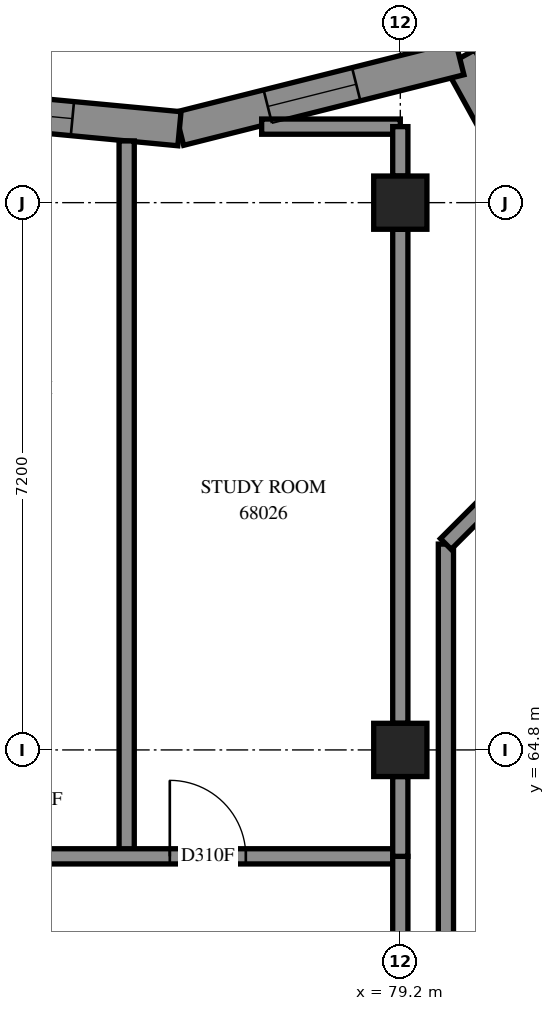
"""IFC4 building model, lengths in metres.
Left out: names, types, materials, properties, quantities, classifications, styles, units other than length and angle.
Written with IfcOpenShell. Run it as: python <this file> out.ifc"""

import sys

from ifc_helpers import new_model, si_unit, direction, frame, frame_2d, origin, origin_2d, place, context, subcontext, project, spatial, polyline, rectangle, outline, extrude, element, fill, save


model = new_model("IFC4")
c1 = context("Model", 3, precision=1e-05, world=origin(), true_north=direction((0.0, 1.0)))
c2 = subcontext(c1, "Body", "Model", "MODEL_VIEW")
j1 = project(units=[si_unit("LENGTHUNIT", "METRE"), si_unit("PLANEANGLEUNIT", "RADIAN")], contexts=[c1])
p1 = place(None, origin())
s1 = spatial("IfcSite", under=j1, at=p1, CompositionType="ELEMENT")
p2 = place(p1, origin())
s2 = spatial("IfcBuilding", under=s1, at=p2, CompositionType="ELEMENT")
p3 = place(p2, frame((0.0, 0.0, 250.6)))
s3 = spatial("IfcBuildingStorey", under=s2, at=p3, CompositionType="ELEMENT", Elevation=250.6)
for number, where, z_axis, x_axis in (
    (1, (79.2, 64.8, 0.0), (0.0, 0.0, 1.0), (1.0, 0.0, 0.0)),
    (2, (79.2, 72.0, 0.0), (0.0, 0.0, 1.0), (1.0, 0.0, 0.0)),
):
    element("IfcColumn", number, at=place(p3, frame(where, z_axis=z_axis, x_axis=x_axis)), inside=s3, PredefinedType="COLUMN", context=c2, shape_type="SweptSolid", body=[
        extrude(rectangle(XDim=0.7, YDim=0.7, at=origin_2d()), origin(), (0.0, 0.0, 1.0), 3.1),
    ])
p4 = place(p3, frame((81.594, 70.98, 0.0), z_axis=(0.0, 0.0, 1.0), x_axis=(-0.4832770015, 0.8754674979, 0.0)))
e3 = element("IfcWall", 3, at=p4, inside=s3, PredefinedType="SOLIDWALL", context=c2, shape_type="SweptSolid", body=[
    extrude(outline(polyline([(0.044, -0.225), (3.51, -0.225), (3.163, 0.225), (-0.044, 0.225), (0.044, -0.225)])), origin(), (0.0, 0.0, 1.0), 3.1),
])
p5 = place(p4, frame((0.757, 0.0, 0.45)))
e4 = element("IfcOpeningElement", 4, at=p5, cuts=e3, PredefinedType="OPENING", context=c2, shape_type="SweptSolid", body=[
    extrude(rectangle(XDim=1.2, YDim=2.55, at=frame_2d((0.6, 1.275))), frame((0.0, 0.235, 0.0), z_axis=(0.0, -1.0, 0.0), x_axis=(1.0, 0.0, 0.0)), (0.0, 0.0, 1.0), 0.47),
])
p6 = place(p3, frame((79.982, 73.9, 0.0), z_axis=(0.0, 0.0, 1.0), x_axis=(-0.9697607809, -0.2440574274, 0.0)))
e5 = element("IfcWall", 5, at=p6, inside=s3, PredefinedType="SOLIDWALL", context=c2, shape_type="SweptSolid", body=[
    extrude(outline(polyline([(-0.173, -0.225), (3.764, -0.225), (3.841, 0.225), (0.173, 0.225), (-0.173, -0.225)])), origin(), (0.0, 0.0, 1.0), 3.1),
])
p7 = place(p6, frame((1.405, 0.0, 0.45)))
e6 = element("IfcOpeningElement", 6, at=p7, cuts=e5, PredefinedType="OPENING", context=c2, shape_type="SweptSolid", body=[
    extrude(rectangle(XDim=1.2, YDim=2.55, at=frame_2d((0.6, 1.275))), frame((0.0, 0.235, 0.0), z_axis=(0.0, -1.0, 0.0), x_axis=(1.0, 0.0, 0.0)), (0.0, 0.0, 1.0), 0.47),
])
p8 = place(p3, frame((76.294, 72.972, 0.0), z_axis=(0.0, 0.0, 1.0), x_axis=(-0.9955612581, 0.0941157869, 0.0)))
e7 = element("IfcWall", 7, at=p8, inside=s3, PredefinedType="SOLIDWALL", context=c2, shape_type="SweptSolid", body=[
    extrude(outline(polyline([(0.039, -0.225), (3.874, -0.225), (3.832, 0.225), (-0.039, 0.225), (0.039, -0.225)])), origin(), (0.0, 0.0, 1.0), 3.1),
])
p9 = place(p8, frame((1.414, 0.0, 0.45)))
e8 = element("IfcOpeningElement", 8, at=p9, cuts=e7, PredefinedType="OPENING", context=c2, shape_type="SweptSolid", body=[
    extrude(rectangle(XDim=1.2, YDim=2.55, at=frame_2d((0.6, 1.275))), frame((0.0, 0.235, 0.0), z_axis=(0.0, -1.0, 0.0), x_axis=(1.0, 0.0, 0.0)), (0.0, 0.0, 1.0), 0.47),
])
p10 = place(p3, frame((79.8, 55.844, 0.0), z_axis=(0.0, 0.0, 1.0), x_axis=(0.0, 1.0, 0.0)))
e9 = element("IfcWall", 9, at=p10, inside=s3, PredefinedType="PARTITIONING", context=c2, shape_type="SweptSolid", body=[
    extrude(rectangle(XDim=11.664, YDim=0.2, at=frame_2d((5.832, 0.0))), origin(), (0.0, 0.0, 1.0), 3.1),
])
p11 = place(p3, frame((79.907, 55.739, 0.0), z_axis=(0.0, 0.0, 1.0), x_axis=(0.7071067812, 0.7071067812, 0.0)))
e10 = element("IfcWall", 10, at=p11, inside=s3, PredefinedType="PARTITIONING", context=c2, shape_type="SweptSolid", body=[
    extrude(rectangle(XDim=9.798, YDim=0.2, at=frame_2d((4.899, 0.0))), origin(), (0.0, 0.0, 1.0), 3.1),
])
p12 = place(p11, frame((0.617, 0.0, 0.0)))
e11 = element("IfcOpeningElement", 11, at=p12, cuts=e10, PredefinedType="OPENING", context=c2, shape_type="SweptSolid", body=[
    extrude(rectangle(XDim=1.0, YDim=2.1, at=frame_2d((0.5, 1.05))), frame((0.0, 0.11, 0.0), z_axis=(0.0, -1.0, 0.0), x_axis=(1.0, 0.0, 0.0)), (0.0, 0.0, 1.0), 0.22),
])
p13 = place(p3, frame((75.6, 63.4, 0.0), z_axis=(0.0, 0.0, 1.0), x_axis=(0.0, 1.0, 0.0)))
e12 = element("IfcWall", 12, at=p13, inside=s3, PredefinedType="PARTITIONING", context=c2, shape_type="SweptSolid", body=[
    extrude(rectangle(XDim=9.412, YDim=0.2, at=frame_2d((4.706, 0.0))), origin(), (0.0, 0.0, 1.0), 3.1),
])
p14 = place(p3, frame((79.2, 65.15, 0.0), z_axis=(0.0, 0.0, 1.0), x_axis=(0.0, 1.0, 0.0)))
e13 = element("IfcWall", 13, at=p14, inside=s3, PredefinedType="PARTITIONING", context=c2, shape_type="SweptSolid", body=[
    extrude(rectangle(XDim=6.5, YDim=0.2, at=frame_2d((3.25, 0.0))), origin(), (0.0, 0.0, 1.0), 3.1),
])
p15 = place(p3, frame((74.402, 63.4, 0.0), z_axis=(0.0, 0.0, 1.0), x_axis=(1.0, 0.0, 0.0)))
e14 = element("IfcWall", 14, at=p15, inside=s3, PredefinedType="PARTITIONING", context=c2, shape_type="SweptSolid", body=[
    extrude(rectangle(XDim=4.798, YDim=0.2, at=frame_2d((2.399, 0.0))), origin(), (0.0, 0.0, 1.0), 3.1),
])
p16 = place(p15, frame((1.766, 0.0, 0.0)))
e15 = element("IfcOpeningElement", 15, at=p16, cuts=e14, PredefinedType="OPENING", context=c2, shape_type="SweptSolid", body=[
    extrude(rectangle(XDim=1.0, YDim=2.1, at=frame_2d((0.5, 1.05))), frame((0.0, 0.11, 0.0), z_axis=(0.0, -1.0, 0.0), x_axis=(1.0, 0.0, 0.0)), (0.0, 0.0, 1.0), 0.22),
])
p17 = place(p3, frame((79.799, 67.509, 0.0), z_axis=(0.0, 0.0, 1.0), x_axis=(0.7070929906, 0.7071205715, 0.0)))
e16 = element("IfcWall", 16, at=p17, inside=s3, PredefinedType="PARTITIONING", context=c2, shape_type="SweptSolid", body=[
    extrude(rectangle(XDim=3.626, YDim=0.2, at=frame_2d((1.813, 0.0))), origin(), (0.0, 0.0, 1.0), 3.1),
])
p18 = place(p3, frame((79.2, 61.4, 0.0), z_axis=(0.0, 0.0, 1.0), x_axis=(0.0, 1.0, 0.0)))
e17 = element("IfcWall", 17, at=p18, inside=s3, PredefinedType="PARTITIONING", context=c2, shape_type="SweptSolid", body=[
    extrude(rectangle(XDim=2.0, YDim=0.2, at=frame_2d((1.0, 0.0))), origin(), (0.0, 0.0, 1.0), 3.1),
])
p19 = place(p3, frame((77.376, 73.0, 0.0), z_axis=(0.0, 0.0, 1.0), x_axis=(1.0, 0.0, 0.0)))
e18 = element("IfcWall", 18, at=p19, inside=s3, PredefinedType="PARTITIONING", context=c2, shape_type="SweptSolid", body=[
    extrude(rectangle(XDim=1.824, YDim=0.2, at=frame_2d((0.912, 0.0))), origin(), (0.0, 0.0, 1.0), 3.1),
])
p20 = place(p3, frame((79.2, 63.4, 0.0), z_axis=(0.0, 0.0, 1.0), x_axis=(0.0, 1.0, 0.0)))
e19 = element("IfcWall", 19, at=p20, inside=s3, PredefinedType="PARTITIONING", context=c2, shape_type="SweptSolid", body=[
    extrude(rectangle(XDim=1.05, YDim=0.2, at=frame_2d((0.525, 0.0))), origin(), (0.0, 0.0, 1.0), 3.1),
])
p21 = place(p3, frame((79.2, 72.35, 0.0), z_axis=(0.0, 0.0, 1.0), x_axis=(0.0, 1.0, 0.0)))
e20 = element("IfcWall", 20, at=p21, inside=s3, PredefinedType="PARTITIONING", context=c2, shape_type="SweptSolid", body=[
    extrude(rectangle(XDim=0.65, YDim=0.2, at=frame_2d((0.325, 0.0))), origin(), (0.0, 0.0, 1.0), 3.1),
])
p22 = place(p7, origin())
e21 = element("IfcWindow", 21, at=p22, inside=s3, PartitioningType="SINGLE_PANEL", PredefinedType="WINDOW", context=c2, shape_type="SweptSolid", body=[
    extrude(rectangle(XDim=1.2, YDim=2.55, at=frame_2d((0.6, 1.275))), frame((0.0, 0.135, 0.0), z_axis=(0.0, -1.0, 0.0), x_axis=(1.0, 0.0, 0.0)), (0.0, 0.0, 1.0), 0.06),
])
fill(e6, e21)
p23 = place(p9, origin())
e22 = element("IfcWindow", 22, at=p23, inside=s3, PartitioningType="SINGLE_PANEL", PredefinedType="WINDOW", context=c2, shape_type="SweptSolid", body=[
    extrude(rectangle(XDim=1.2, YDim=2.55, at=frame_2d((0.6, 1.275))), frame((0.0, 0.205, 0.0), z_axis=(0.0, -1.0, 0.0), x_axis=(1.0, 0.0, 0.0)), (0.0, 0.0, 1.0), 0.06),
])
fill(e8, e22)
p24 = place(p16, origin())
e23 = element("IfcDoor", 23, at=p24, inside=s3, OperationType="SINGLE_SWING_LEFT", PredefinedType="DOOR", context=c2, shape_type="SweptSolid", body=[
    extrude(rectangle(XDim=1.0, YDim=2.1, at=frame_2d((0.5, 1.05))), frame((0.0, 0.025, 0.0), z_axis=(0.0, -1.0, 0.0), x_axis=(1.0, 0.0, 0.0)), (0.0, 0.0, 1.0), 0.05),
])
fill(e15, e23)
save(model, sys.argv[1])
